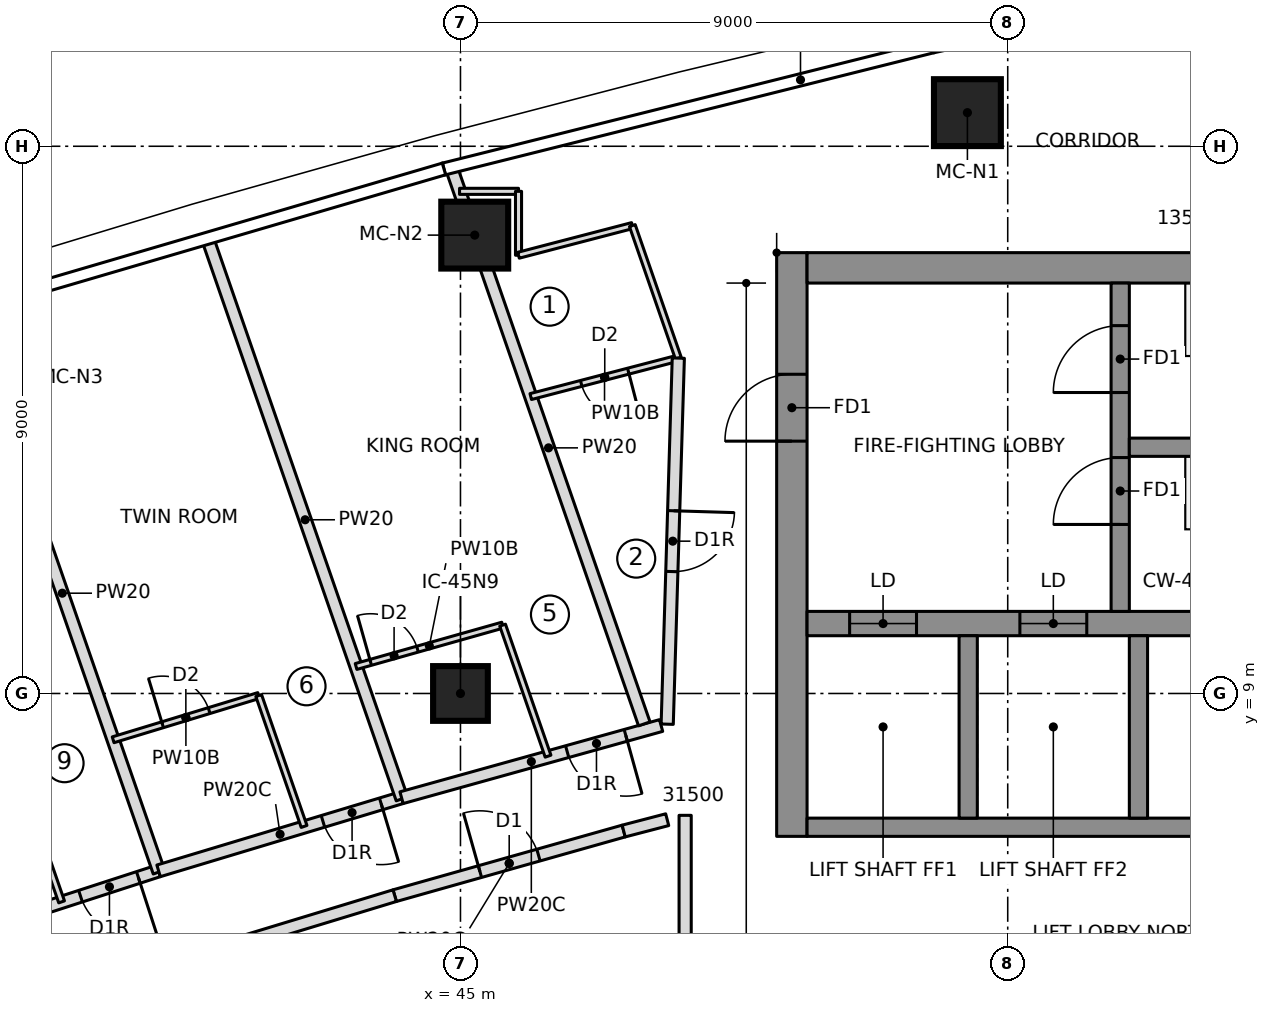
"""IFC4 building model, lengths in metres.
Left out: names, types, materials, properties, quantities, classifications, styles, units other than length and angle.
Written with IfcOpenShell. Run it as: python <this file> out.ifc"""

import sys

from ifc_helpers import new_model, si_unit, direction, frame, frame_2d, origin, origin_2d, place, context, subcontext, project, spatial, polyline, rectangle, outline, extrude, element, fill, save


model = new_model("IFC4")
c1 = context("Model", 3, precision=1e-05, world=origin(), true_north=direction((0.0, 1.0)))
c2 = subcontext(c1, "Body", "Model", "MODEL_VIEW")
j1 = project(units=[si_unit("LENGTHUNIT", "METRE"), si_unit("PLANEANGLEUNIT", "RADIAN")], contexts=[c1])
p1 = place(None, origin())
s1 = spatial("IfcSite", under=j1, at=p1, CompositionType="ELEMENT")
p2 = place(p1, origin())
s2 = spatial("IfcBuilding", under=s1, at=p2, CompositionType="ELEMENT")
p3 = place(p2, frame((0.0, 0.0, 285.65)))
s3 = spatial("IfcBuildingStorey", under=s2, at=p3, CompositionType="ELEMENT", Elevation=285.65)
p4 = place(p3, frame((50.45, 6.65, 0.0), z_axis=(0.0, 0.0, 1.0), x_axis=(0.0, 1.0, 0.0)))
e1 = element("IfcWall", 1, at=p4, inside=s3, PredefinedType="SHEAR", context=c2, shape_type="SweptSolid", body=[
    extrude(rectangle(XDim=9.6, YDim=0.5, at=frame_2d((4.8, 0.0))), origin(), (0.0, 0.0, 1.0), 3.55),
])
p5 = place(p4, frame((6.5, 0.0, 0.0)))
e2 = element("IfcOpeningElement", 2, at=p5, cuts=e1, PredefinedType="OPENING", context=c2, shape_type="SweptSolid", body=[
    extrude(rectangle(XDim=1.1, YDim=2.1, at=frame_2d((0.55, 1.05))), frame((0.0, 0.26, 0.0), z_axis=(0.0, -1.0, 0.0), x_axis=(1.0, 0.0, 0.0)), (0.0, 0.0, 1.0), 0.52),
])
p6 = place(p3, frame((50.7, 16.0, 0.0), z_axis=(0.0, 0.0, 1.0), x_axis=(1.0, 0.0, 0.0)))
e3 = element("IfcWall", 3, at=p6, inside=s3, PredefinedType="SHEAR", context=c2, shape_type="SweptSolid", body=[
    extrude(rectangle(XDim=13.52, YDim=0.5, at=frame_2d((6.76, 0.0))), origin(), (0.0, 0.0, 1.0), 3.55),
])
p7 = place(p3, frame((50.7, 10.15, 0.0), z_axis=(0.0, 0.0, 1.0), x_axis=(1.0, 0.0, 0.0)))
e4 = element("IfcWall", 4, at=p7, inside=s3, PredefinedType="SHEAR", context=c2, shape_type="SweptSolid", body=[
    extrude(rectangle(XDim=13.02, YDim=0.4, at=frame_2d((6.51, 0.0))), origin(), (0.0, 0.0, 1.0), 3.55),
])
p8 = place(p7, frame((0.7, 0.0, 0.0)))
e5 = element("IfcOpeningElement", 5, at=p8, cuts=e4, PredefinedType="OPENING", context=c2, shape_type="SweptSolid", body=[
    extrude(rectangle(XDim=1.1, YDim=2.1, at=frame_2d((0.55, 1.05))), frame((0.0, 0.21, 0.0), z_axis=(0.0, -1.0, 0.0), x_axis=(1.0, 0.0, 0.0)), (0.0, 0.0, 1.0), 0.42),
])
p9 = place(p7, frame((3.5, 0.0, 0.0)))
e6 = element("IfcOpeningElement", 6, at=p9, cuts=e4, PredefinedType="OPENING", context=c2, shape_type="SweptSolid", body=[
    extrude(rectangle(XDim=1.1, YDim=2.1, at=frame_2d((0.55, 1.05))), frame((0.0, 0.21, 0.0), z_axis=(0.0, -1.0, 0.0), x_axis=(1.0, 0.0, 0.0)), (0.0, 0.0, 1.0), 0.42),
])
p10 = place(p3, frame((50.7, 6.8, 0.0), z_axis=(0.0, 0.0, 1.0), x_axis=(1.0, 0.0, 0.0)))
e7 = element("IfcWall", 7, at=p10, inside=s3, PredefinedType="SHEAR", context=c2, shape_type="SweptSolid", body=[
    extrude(rectangle(XDim=10.9, YDim=0.3, at=frame_2d((5.45, 0.0))), origin(), (0.0, 0.0, 1.0), 3.55),
])
p11 = place(p10, frame((6.4, 0.0, 0.0)))
e8 = element("IfcOpeningElement", 8, at=p11, cuts=e7, PredefinedType="OPENING", context=c2, shape_type="SweptSolid", body=[
    extrude(rectangle(XDim=0.9, YDim=2.1, at=frame_2d((0.45, 1.05))), frame((0.0, 0.16, 0.0), z_axis=(0.0, -1.0, 0.0), x_axis=(1.0, 0.0, 0.0)), (0.0, 0.0, 1.0), 0.32),
])
p12 = place(p10, frame((9.2, 0.0, 0.0)))
e9 = element("IfcOpeningElement", 9, at=p12, cuts=e7, PredefinedType="OPENING", context=c2, shape_type="SweptSolid", body=[
    extrude(rectangle(XDim=0.9, YDim=2.1, at=frame_2d((0.45, 1.05))), frame((0.0, 0.16, 0.0), z_axis=(0.0, -1.0, 0.0), x_axis=(1.0, 0.0, 0.0)), (0.0, 0.0, 1.0), 0.32),
])
for number, where, z_axis, x_axis in (
    (10, (53.35, 6.95, 0.0), (0.0, 0.0, 1.0), (0.0, 1.0, 0.0)),
    (11, (56.15, 6.95, 0.0), (0.0, 0.0, 1.0), (0.0, 1.0, 0.0)),
):
    element("IfcWall", number, at=place(p3, frame(where, z_axis=z_axis, x_axis=x_axis)), inside=s3, PredefinedType="SHEAR", context=c2, shape_type="SweptSolid", body=[
        extrude(rectangle(XDim=3.0, YDim=0.3, at=frame_2d((1.5, 0.0))), origin(), (0.0, 0.0, 1.0), 3.55),
    ])
p13 = place(p3, frame((55.85, 10.35, 0.0), z_axis=(0.0, 0.0, 1.0), x_axis=(0.0, 1.0, 0.0)))
e12 = element("IfcWall", 12, at=p13, inside=s3, PredefinedType="SHEAR", context=c2, shape_type="SweptSolid", body=[
    extrude(rectangle(XDim=5.4, YDim=0.3, at=frame_2d((2.7, 0.0))), origin(), (0.0, 0.0, 1.0), 3.55),
])
p14 = place(p13, frame((1.43, 0.0, 0.0)))
e13 = element("IfcOpeningElement", 13, at=p14, cuts=e12, PredefinedType="OPENING", context=c2, shape_type="SweptSolid", body=[
    extrude(rectangle(XDim=1.1, YDim=2.1, at=frame_2d((0.55, 1.05))), frame((0.0, 0.16, 0.0), z_axis=(0.0, -1.0, 0.0), x_axis=(1.0, 0.0, 0.0)), (0.0, 0.0, 1.0), 0.32),
])
p15 = place(p13, frame((3.6, 0.0, 0.0)))
e14 = element("IfcOpeningElement", 14, at=p15, cuts=e12, PredefinedType="OPENING", context=c2, shape_type="SweptSolid", body=[
    extrude(rectangle(XDim=1.1, YDim=2.1, at=frame_2d((0.55, 1.05))), frame((0.0, 0.16, 0.0), z_axis=(0.0, -1.0, 0.0), x_axis=(1.0, 0.0, 0.0)), (0.0, 0.0, 1.0), 0.32),
])
p16 = place(p3, frame((56.0, 13.05, 0.0), z_axis=(0.0, 0.0, 1.0), x_axis=(1.0, 0.0, 0.0)))
e15 = element("IfcWall", 15, at=p16, inside=s3, PredefinedType="SHEAR", context=c2, shape_type="SweptSolid", body=[
    extrude(rectangle(XDim=7.72, YDim=0.3, at=frame_2d((3.86, 0.0))), origin(), (0.0, 0.0, 1.0), 3.55),
])
for number, where, z_axis, x_axis in (
    (16, (53.337, 18.553, 0.0), (0.0, 0.0, 1.0), (1.0, 0.0, 0.0)),
    (17, (45.235, 16.539, 0.0), (0.0, 0.0, 1.0), (1.0, 0.0, 0.0)),
):
    element("IfcColumn", number, at=place(p3, frame(where, z_axis=z_axis, x_axis=x_axis)), inside=s3, PredefinedType="COLUMN", context=c2, shape_type="SweptSolid", body=[
        extrude(rectangle(XDim=1.1, YDim=1.1, at=origin_2d()), origin(), (0.0, 0.0, 1.0), 3.55),
    ])
p17 = place(p3, frame((45.0, 9.0, 0.0), z_axis=(0.0, 0.0, 1.0), x_axis=(1.0, 0.0, 0.0)))
e18 = element("IfcColumn", 18, at=p17, inside=s3, PredefinedType="COLUMN", context=c2, shape_type="SweptSolid", body=[
    extrude(rectangle(XDim=0.9, YDim=0.9, at=origin_2d()), origin(), (0.0, 0.0, 1.0), 3.55),
])
p18 = place(p3, frame((56.785, 20.615, 0.0), z_axis=(0.0, 0.0, 1.0), x_axis=(-0.977020225348, -0.213146614471, 0.0)))
e19 = element("IfcWall", 19, at=p18, inside=s3, PredefinedType="NOTDEFINED", context=c2, shape_type="SweptSolid", body=[
    extrude(outline(polyline([(-0.029, -0.2), (4.142, -0.2), (4.142, 0.2), (0.029, 0.2), (-0.029, -0.2)])), origin(), (0.0, 0.0, 1.0), 3.25),
])
p19 = place(p3, frame((40.035, 6.083, 0.0), z_axis=(0.0, 0.0, 1.0), x_axis=(-0.951196378796, -0.308586209941, 0.0)))
e20 = element("IfcWall", 20, at=p19, inside=s3, PredefinedType="PARTITIONING", context=c2, shape_type="SweptSolid", body=[
    extrude(rectangle(XDim=4.175, YDim=0.2, at=frame_2d((2.087, 0.0))), origin(), (0.0, 0.0, 1.0), 3.25),
])
p20 = place(p19, frame((0.35, 0.0, 0.0)))
e21 = element("IfcOpeningElement", 21, at=p20, cuts=e20, PredefinedType="OPENING", context=c2, shape_type="SweptSolid", body=[
    extrude(rectangle(XDim=1.0, YDim=2.1, at=frame_2d((0.5, 1.05))), frame((0.0, 0.11, 0.0), z_axis=(0.0, -1.0, 0.0), x_axis=(1.0, 0.0, 0.0)), (0.0, 0.0, 1.0), 0.22),
])
p21 = place(p3, frame((37.694, 7.724, 0.0), z_axis=(0.0, 0.0, 1.0), x_axis=(0.327622330203, -0.944808768351, 0.0)))
e22 = element("IfcWall", 22, at=p21, inside=s3, PredefinedType="PARTITIONING", context=c2, shape_type="SweptSolid", body=[
    extrude(rectangle(XDim=2.277, YDim=0.1, at=frame_2d((1.139, 0.0))), origin(), (0.0, 0.0, 1.0), 3.25),
])
p22 = place(p3, frame((40.042, 6.064, 0.0), z_axis=(0.0, 0.0, 1.0), x_axis=(-0.327710853631, 0.944778067279, 0.0)))
e23 = element("IfcWall", 23, at=p22, inside=s3, PredefinedType="PARTITIONING", context=c2, shape_type="SweptSolid", body=[
    extrude(rectangle(XDim=9.707, YDim=0.2, at=frame_2d((4.854, 0.0))), origin(), (0.0, 0.0, 1.0), 3.25),
])
p23 = place(p3, frame((44.031, 7.286, 0.0), z_axis=(0.0, 0.0, 1.0), x_axis=(-0.957521424208, -0.288362137222, 0.0)))
e24 = element("IfcWall", 24, at=p23, inside=s3, PredefinedType="PARTITIONING", context=c2, shape_type="SweptSolid", body=[
    extrude(rectangle(XDim=4.173, YDim=0.2, at=frame_2d((2.086, 0.0))), origin(), (0.0, 0.0, 1.0), 3.25),
])
p24 = place(p23, frame((0.35, 0.0, 0.0)))
e25 = element("IfcOpeningElement", 25, at=p24, cuts=e24, PredefinedType="OPENING", context=c2, shape_type="SweptSolid", body=[
    extrude(rectangle(XDim=1.0, YDim=2.1, at=frame_2d((0.5, 1.05))), frame((0.0, 0.11, 0.0), z_axis=(0.0, -1.0, 0.0), x_axis=(1.0, 0.0, 0.0)), (0.0, 0.0, 1.0), 0.22),
])
p25 = place(p3, frame((39.288, 8.238, 0.0), z_axis=(0.0, 0.0, 1.0), x_axis=(0.956723503196, 0.290998519638, 0.0)))
e26 = element("IfcWall", 26, at=p25, inside=s3, PredefinedType="PARTITIONING", context=c2, shape_type="SweptSolid", body=[
    extrude(rectangle(XDim=2.502, YDim=0.1, at=frame_2d((1.251, 0.0))), origin(), (0.0, 0.0, 1.0), 3.25),
])
p26 = place(p25, frame((0.85, 0.0, 0.0)))
e27 = element("IfcOpeningElement", 27, at=p26, cuts=e26, PredefinedType="OPENING", context=c2, shape_type="SweptSolid", body=[
    extrude(rectangle(XDim=0.8, YDim=2.1, at=frame_2d((0.4, 1.05))), frame((0.0, 0.06, 0.0), z_axis=(0.0, -1.0, 0.0), x_axis=(1.0, 0.0, 0.0)), (0.0, 0.0, 1.0), 0.12),
])
p27 = place(p3, frame((41.681, 8.966, 0.0), z_axis=(0.0, 0.0, 1.0), x_axis=(0.327743427431, -0.944766767925, 0.0)))
e28 = element("IfcWall", 28, at=p27, inside=s3, PredefinedType="PARTITIONING", context=c2, shape_type="SweptSolid", body=[
    extrude(rectangle(XDim=2.279, YDim=0.1, at=frame_2d((1.139, 0.0))), origin(), (0.0, 0.0, 1.0), 3.25),
])
p28 = place(p3, frame((44.038, 7.267, 0.0), z_axis=(0.0, 0.0, 1.0), x_axis=(-0.327714576096, 0.944776776077, 0.0)))
e29 = element("IfcWall", 29, at=p28, inside=s3, PredefinedType="PARTITIONING", context=c2, shape_type="SweptSolid", body=[
    extrude(rectangle(XDim=9.717, YDim=0.2, at=frame_2d((4.858, 0.0))), origin(), (0.0, 0.0, 1.0), 3.25),
])
p29 = place(p3, frame((48.299, 8.473, 0.0), z_axis=(0.0, 0.0, 1.0), x_axis=(-0.96343417102, -0.267945140115, 0.0)))
e30 = element("IfcWall", 30, at=p29, inside=s3, PredefinedType="PARTITIONING", context=c2, shape_type="SweptSolid", body=[
    extrude(rectangle(XDim=4.43, YDim=0.2, at=frame_2d((2.215, 0.0))), origin(), (0.0, 0.0, 1.0), 3.25),
])
p30 = place(p29, frame((0.603, 0.0, 0.0)))
e31 = element("IfcOpeningElement", 31, at=p30, cuts=e30, PredefinedType="OPENING", context=c2, shape_type="SweptSolid", body=[
    extrude(rectangle(XDim=1.0, YDim=2.1, at=frame_2d((0.5, 1.05))), frame((0.0, 0.11, 0.0), z_axis=(0.0, -1.0, 0.0), x_axis=(1.0, 0.0, 0.0)), (0.0, 0.0, 1.0), 0.22),
])
p31 = place(p3, frame((43.283, 9.444, 0.0), z_axis=(0.0, 0.0, 1.0), x_axis=(0.962409173596, 0.271603723424, 0.0)))
e32 = element("IfcWall", 32, at=p31, inside=s3, PredefinedType="PARTITIONING", context=c2, shape_type="SweptSolid", body=[
    extrude(rectangle(XDim=2.504, YDim=0.1, at=frame_2d((1.252, 0.0))), origin(), (0.0, 0.0, 1.0), 3.25),
])
p32 = place(p31, frame((0.25, 0.0, 0.0)))
e33 = element("IfcOpeningElement", 33, at=p32, cuts=e32, PredefinedType="OPENING", context=c2, shape_type="SweptSolid", body=[
    extrude(rectangle(XDim=0.8, YDim=2.1, at=frame_2d((0.4, 1.05))), frame((0.0, 0.06, 0.0), z_axis=(0.0, -1.0, 0.0), x_axis=(1.0, 0.0, 0.0)), (0.0, 0.0, 1.0), 0.12),
])
p33 = place(p3, frame((45.693, 10.124, 0.0), z_axis=(0.0, 0.0, 1.0), x_axis=(0.327764902685, -0.944759317799, 0.0)))
e34 = element("IfcWall", 34, at=p33, inside=s3, PredefinedType="PARTITIONING", context=c2, shape_type="SweptSolid", body=[
    extrude(rectangle(XDim=2.281, YDim=0.1, at=frame_2d((1.14, 0.0))), origin(), (0.0, 0.0, 1.0), 3.25),
])
p34 = place(p3, frame((48.023, 8.5, 0.0), z_axis=(0.0, 0.0, 1.0), x_axis=(-0.327705598625, 0.944779890043, 0.0)))
e35 = element("IfcWall", 35, at=p34, inside=s3, PredefinedType="PARTITIONING", context=c2, shape_type="SweptSolid", body=[
    extrude(rectangle(XDim=9.61, YDim=0.2, at=frame_2d((4.805, 0.0))), origin(), (0.0, 0.0, 1.0), 3.25),
])
p35 = place(p3, frame((48.583, 14.516, 0.0), z_axis=(0.0, 0.0, 1.0), x_axis=(-0.967665843663, -0.252235633897, 0.0)))
e36 = element("IfcWall", 36, at=p35, inside=s3, PredefinedType="PARTITIONING", context=c2, shape_type="SweptSolid", body=[
    extrude(rectangle(XDim=2.508, YDim=0.1, at=frame_2d((1.254, 0.0))), origin(), (0.0, 0.0, 1.0), 3.25),
])
p36 = place(p35, frame((0.85, 0.0, 0.0)))
e37 = element("IfcOpeningElement", 37, at=p36, cuts=e36, PredefinedType="OPENING", context=c2, shape_type="SweptSolid", body=[
    extrude(rectangle(XDim=0.8, YDim=2.1, at=frame_2d((0.4, 1.05))), frame((0.0, 0.06, 0.0), z_axis=(0.0, -1.0, 0.0), x_axis=(1.0, 0.0, 0.0)), (0.0, 0.0, 1.0), 0.12),
])
p37 = place(p3, frame((44.985, 17.259, 0.0), z_axis=(0.0, 0.0, 1.0), x_axis=(1.0, 0.0, 0.0)))
e38 = element("IfcWall", 38, at=p37, inside=s3, PredefinedType="PARTITIONING", context=c2, shape_type="SweptSolid", body=[
    extrude(rectangle(XDim=0.97, YDim=0.1, at=frame_2d((0.485, 0.0))), origin(), (0.0, 0.0, 1.0), 3.25),
])
p38 = place(p3, frame((45.955, 17.259, 0.0), z_axis=(0.0, 0.0, 1.0), x_axis=(0.0, -1.0, 0.0)))
e39 = element("IfcWall", 39, at=p38, inside=s3, PredefinedType="PARTITIONING", context=c2, shape_type="SweptSolid", body=[
    extrude(rectangle(XDim=1.051, YDim=0.1, at=frame_2d((0.525, 0.0))), origin(), (0.0, 0.0, 1.0), 3.25),
])
p39 = place(p3, frame((45.955, 16.208, 0.0), z_axis=(0.0, 0.0, 1.0), x_axis=(0.967650770907, 0.25229345129, 0.0)))
e40 = element("IfcWall", 40, at=p39, inside=s3, PredefinedType="PARTITIONING", context=c2, shape_type="SweptSolid", body=[
    extrude(rectangle(XDim=1.934, YDim=0.1, at=frame_2d((0.967, 0.0))), origin(), (0.0, 0.0, 1.0), 3.25),
])
p40 = place(p3, frame((47.826, 16.696, 0.0), z_axis=(0.0, 0.0, 1.0), x_axis=(0.327695604762, -0.944783356447, 0.0)))
e41 = element("IfcWall", 41, at=p40, inside=s3, PredefinedType="PARTITIONING", context=c2, shape_type="SweptSolid", body=[
    extrude(rectangle(XDim=2.307, YDim=0.1, at=frame_2d((1.154, 0.0))), origin(), (0.0, 0.0, 1.0), 3.25),
])
p41 = place(p3, frame((43.918, 5.675, 0.0), z_axis=(0.0, 0.0, 1.0), x_axis=(0.962411212211, 0.271596499628, 0.0)))
e42 = element("IfcWall", 42, at=p41, inside=s3, PredefinedType="PARTITIONING", context=c2, shape_type="SweptSolid", body=[
    extrude(rectangle(XDim=3.913, YDim=0.2, at=frame_2d((1.957, 0.0))), origin(), (0.0, 0.0, 1.0), 3.25),
])
p42 = place(p41, frame((1.457, 0.0, 0.0)))
e43 = element("IfcOpeningElement", 43, at=p42, cuts=e42, PredefinedType="OPENING", context=c2, shape_type="SweptSolid", body=[
    extrude(rectangle(XDim=1.0, YDim=2.1, at=frame_2d((0.5, 1.05))), frame((0.0, 0.11, 0.0), z_axis=(0.0, -1.0, 0.0), x_axis=(1.0, 0.0, 0.0)), (0.0, 0.0, 1.0), 0.22),
])
p43 = place(p3, frame((41.043, 4.8, 0.0), z_axis=(0.0, 0.0, 1.0), x_axis=(0.956717150932, 0.291019403327, 0.0)))
e44 = element("IfcWall", 44, at=p43, inside=s3, PredefinedType="PARTITIONING", context=c2, shape_type="SweptSolid", body=[
    extrude(rectangle(XDim=3.006, YDim=0.2, at=frame_2d((1.503, 0.0))), origin(), (0.0, 0.0, 1.0), 3.25),
])
p44 = place(p3, frame((47.684, 6.738, 0.0), z_axis=(0.0, 0.0, 1.0), x_axis=(0.967585713416, 0.252542842294, 0.0)))
e45 = element("IfcWall", 45, at=p44, inside=s3, PredefinedType="PARTITIONING", context=c2, shape_type="SweptSolid", body=[
    extrude(rectangle(XDim=0.74, YDim=0.2, at=frame_2d((0.37, 0.0))), origin(), (0.0, 0.0, 1.0), 3.25),
])
p45 = place(p3, frame((48.583, 14.516, 0.0), z_axis=(0.0, 0.0, 1.0), x_axis=(-0.030318578026, -0.999540286245, 0.0)))
e46 = element("IfcWall", 46, at=p45, inside=s3, PredefinedType="PARTITIONING", context=c2, shape_type="SweptSolid", body=[
    extrude(rectangle(XDim=6.023, YDim=0.2, at=frame_2d((3.012, 0.0))), origin(), (0.0, 0.0, 1.0), 3.25),
])
p46 = place(p45, frame((2.512, 0.0, 0.0)))
e47 = element("IfcOpeningElement", 47, at=p46, cuts=e46, PredefinedType="OPENING", context=c2, shape_type="SweptSolid", body=[
    extrude(rectangle(XDim=1.0, YDim=2.1, at=frame_2d((0.5, 1.05))), frame((0.0, 0.11, 0.0), z_axis=(0.0, -1.0, 0.0), x_axis=(1.0, 0.0, 0.0)), (0.0, 0.0, 1.0), 0.22),
])
p47 = place(p3, frame((48.695, 6.996, 0.0), z_axis=(0.0, 0.0, 1.0), x_axis=(0.0, -1.0, 0.0)))
e48 = element("IfcWall", 48, at=p47, inside=s3, PredefinedType="PARTITIONING", context=c2, shape_type="SweptSolid", body=[
    extrude(rectangle(XDim=13.992, YDim=0.2, at=frame_2d((6.996, 0.0))), origin(), (0.0, 0.0, 1.0), 3.25),
])
p48 = place(p20, origin())
e49 = element("IfcDoor", 49, at=p48, inside=s3, OperationType="SINGLE_SWING_RIGHT", PredefinedType="DOOR", context=c2, shape_type="SweptSolid", body=[
    extrude(rectangle(XDim=1.0, YDim=2.1, at=frame_2d((0.5, 1.05))), frame((0.0, 0.025, 0.0), z_axis=(0.0, -1.0, 0.0), x_axis=(1.0, 0.0, 0.0)), (0.0, 0.0, 1.0), 0.05),
])
fill(e21, e49)
p49 = place(p26, origin())
e50 = element("IfcDoor", 50, at=p49, inside=s3, OperationType="SINGLE_SWING_LEFT", PredefinedType="DOOR", context=c2, shape_type="SweptSolid", body=[
    extrude(rectangle(XDim=0.8, YDim=2.1, at=frame_2d((0.4, 1.05))), frame((0.0, 0.025, 0.0), z_axis=(0.0, -1.0, 0.0), x_axis=(1.0, 0.0, 0.0)), (0.0, 0.0, 1.0), 0.05),
])
fill(e27, e50)
p50 = place(p24, origin())
e51 = element("IfcDoor", 51, at=p50, inside=s3, OperationType="SINGLE_SWING_RIGHT", PredefinedType="DOOR", context=c2, shape_type="SweptSolid", body=[
    extrude(rectangle(XDim=1.0, YDim=2.1, at=frame_2d((0.5, 1.05))), frame((0.0, 0.025, 0.0), z_axis=(0.0, -1.0, 0.0), x_axis=(1.0, 0.0, 0.0)), (0.0, 0.0, 1.0), 0.05),
])
fill(e25, e51)
p51 = place(p32, origin())
e52 = element("IfcDoor", 52, at=p51, inside=s3, OperationType="SINGLE_SWING_LEFT", PredefinedType="DOOR", context=c2, shape_type="SweptSolid", body=[
    extrude(rectangle(XDim=0.8, YDim=2.1, at=frame_2d((0.4, 1.05))), frame((0.0, 0.025, 0.0), z_axis=(0.0, -1.0, 0.0), x_axis=(1.0, 0.0, 0.0)), (0.0, 0.0, 1.0), 0.05),
])
fill(e33, e52)
p52 = place(p30, origin())
e53 = element("IfcDoor", 53, at=p52, inside=s3, OperationType="SINGLE_SWING_RIGHT", PredefinedType="DOOR", context=c2, shape_type="SweptSolid", body=[
    extrude(rectangle(XDim=1.0, YDim=2.1, at=frame_2d((0.5, 1.05))), frame((0.0, 0.025, 0.0), z_axis=(0.0, -1.0, 0.0), x_axis=(1.0, 0.0, 0.0)), (0.0, 0.0, 1.0), 0.05),
])
fill(e31, e53)
p53 = place(p36, origin())
e54 = element("IfcDoor", 54, at=p53, inside=s3, OperationType="SINGLE_SWING_LEFT", PredefinedType="DOOR", context=c2, shape_type="SweptSolid", body=[
    extrude(rectangle(XDim=0.8, YDim=2.1, at=frame_2d((0.4, 1.05))), frame((0.0, 0.025, 0.0), z_axis=(0.0, -1.0, 0.0), x_axis=(1.0, 0.0, 0.0)), (0.0, 0.0, 1.0), 0.05),
])
fill(e37, e54)
p54 = place(p42, origin())
e55 = element("IfcDoor", 55, at=p54, inside=s3, OperationType="SINGLE_SWING_LEFT", PredefinedType="DOOR", context=c2, shape_type="SweptSolid", body=[
    extrude(rectangle(XDim=1.0, YDim=2.1, at=frame_2d((0.5, 1.05))), frame((0.0, 0.025, 0.0), z_axis=(0.0, -1.0, 0.0), x_axis=(1.0, 0.0, 0.0)), (0.0, 0.0, 1.0), 0.05),
])
fill(e43, e55)
p55 = place(p46, origin())
e56 = element("IfcDoor", 56, at=p55, inside=s3, OperationType="SINGLE_SWING_RIGHT", PredefinedType="DOOR", context=c2, shape_type="SweptSolid", body=[
    extrude(rectangle(XDim=1.0, YDim=2.1, at=frame_2d((0.5, 1.05))), frame((0.0, 0.025, 0.0), z_axis=(0.0, -1.0, 0.0), x_axis=(1.0, 0.0, 0.0)), (0.0, 0.0, 1.0), 0.05),
])
fill(e47, e56)
p56 = place(p8, origin())
e57 = element("IfcDoor", 57, at=p56, inside=s3, OperationType="DOUBLE_DOOR_SLIDING", PredefinedType="DOOR", context=c2, shape_type="SweptSolid", body=[
    extrude(rectangle(XDim=1.1, YDim=2.1, at=frame_2d((0.55, 1.05))), frame((0.0, 0.025, 0.0), z_axis=(0.0, -1.0, 0.0), x_axis=(1.0, 0.0, 0.0)), (0.0, 0.0, 1.0), 0.05),
])
fill(e5, e57)
p57 = place(p9, origin())
e58 = element("IfcDoor", 58, at=p57, inside=s3, OperationType="DOUBLE_DOOR_SLIDING", PredefinedType="DOOR", context=c2, shape_type="SweptSolid", body=[
    extrude(rectangle(XDim=1.1, YDim=2.1, at=frame_2d((0.55, 1.05))), frame((0.0, 0.025, 0.0), z_axis=(0.0, -1.0, 0.0), x_axis=(1.0, 0.0, 0.0)), (0.0, 0.0, 1.0), 0.05),
])
fill(e6, e58)
p58 = place(p14, origin())
e59 = element("IfcDoor", 59, at=p58, inside=s3, OperationType="SINGLE_SWING_RIGHT", PredefinedType="DOOR", context=c2, shape_type="SweptSolid", body=[
    extrude(rectangle(XDim=1.1, YDim=2.1, at=frame_2d((0.55, 1.05))), frame((0.0, 0.025, 0.0), z_axis=(0.0, -1.0, 0.0), x_axis=(1.0, 0.0, 0.0)), (0.0, 0.0, 1.0), 0.05),
])
fill(e13, e59)
p59 = place(p15, origin())
e60 = element("IfcDoor", 60, at=p59, inside=s3, OperationType="SINGLE_SWING_RIGHT", PredefinedType="DOOR", context=c2, shape_type="SweptSolid", body=[
    extrude(rectangle(XDim=1.1, YDim=2.1, at=frame_2d((0.55, 1.05))), frame((0.0, 0.025, 0.0), z_axis=(0.0, -1.0, 0.0), x_axis=(1.0, 0.0, 0.0)), (0.0, 0.0, 1.0), 0.05),
])
fill(e14, e60)
p60 = place(p5, origin())
e61 = element("IfcDoor", 61, at=p60, inside=s3, OperationType="SINGLE_SWING_RIGHT", PredefinedType="DOOR", context=c2, shape_type="SweptSolid", body=[
    extrude(rectangle(XDim=1.1, YDim=2.1, at=frame_2d((0.55, 1.05))), frame((0.0, 0.025, 0.0), z_axis=(0.0, -1.0, 0.0), x_axis=(1.0, 0.0, 0.0)), (0.0, 0.0, 1.0), 0.05),
])
fill(e2, e61)
save(model, sys.argv[1])
